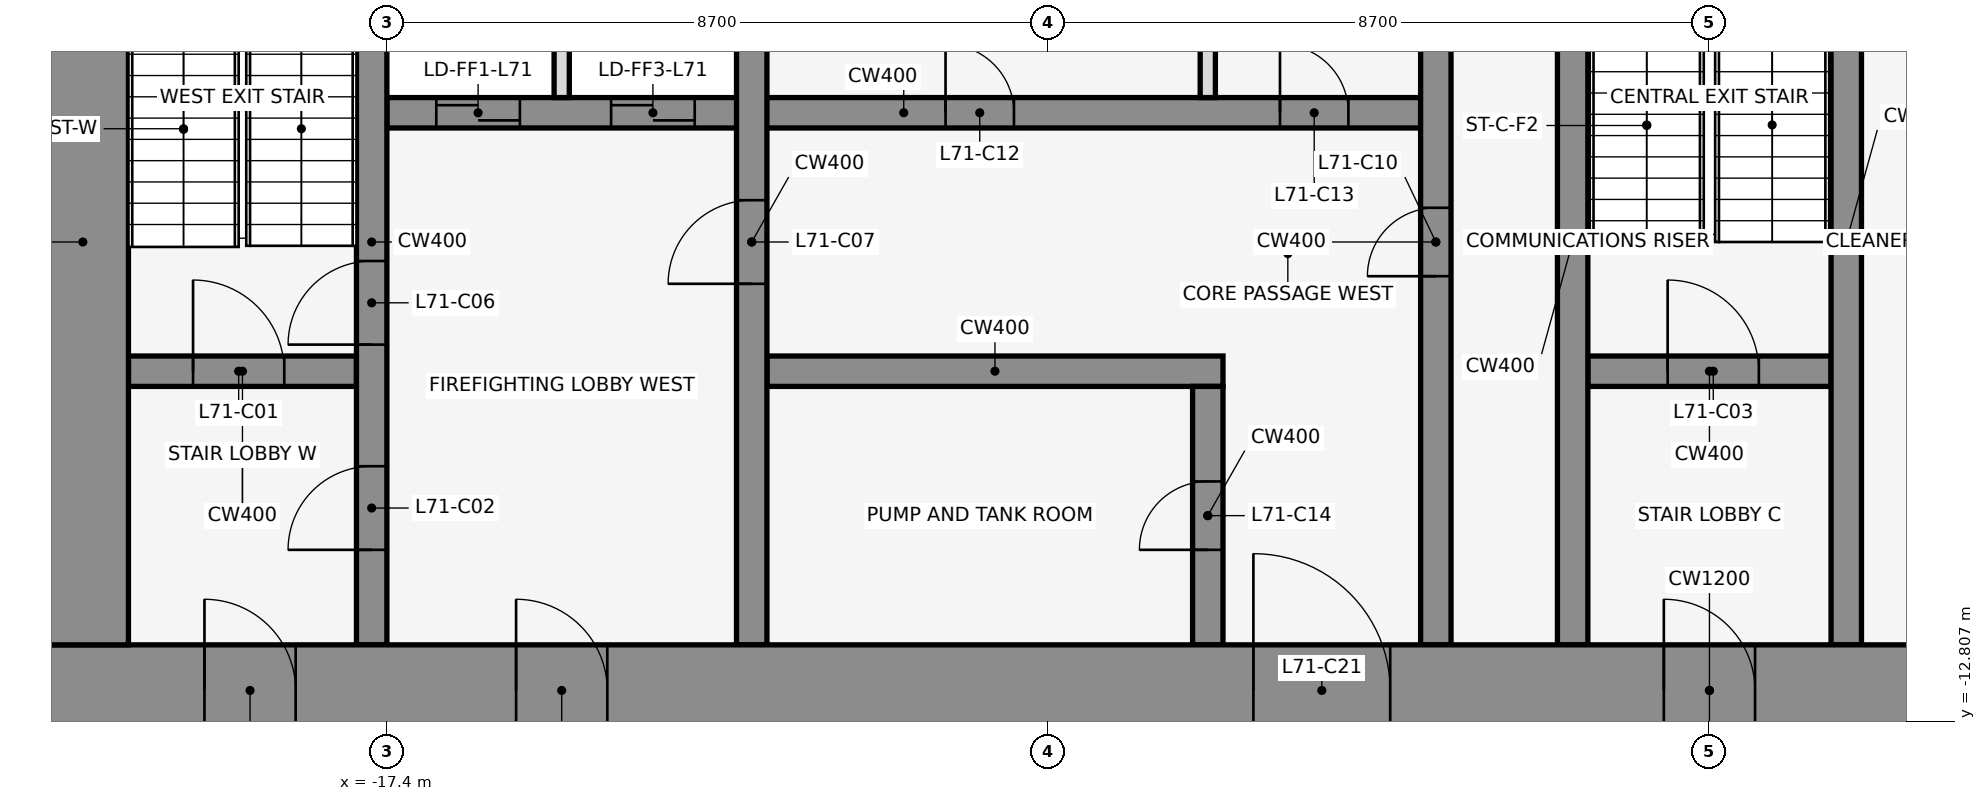
"""IFC4 building model, lengths in metres.
Left out: names, types, materials, properties, quantities, classifications, styles, units other than length and angle.
Written with IfcOpenShell. Run it as: python <this file> out.ifc"""

import sys

from ifc_helpers import new_model, si_unit, direction, frame, frame_2d, origin, place, context, subcontext, project, spatial, rectangle, extrude, element, fill, save


model = new_model("IFC4")
c1 = context("Model", 3, precision=1e-05, world=origin(), true_north=direction((0.0, 1.0)))
c2 = subcontext(c1, "Body", "Model", "MODEL_VIEW")
j1 = project(units=[si_unit("LENGTHUNIT", "METRE"), si_unit("PLANEANGLEUNIT", "RADIAN")], contexts=[c1])
p1 = place(None, origin())
s1 = spatial("IfcSite", under=j1, at=p1, CompositionType="ELEMENT")
p2 = place(p1, origin())
s2 = spatial("IfcBuilding", under=s1, at=p2, CompositionType="ELEMENT")
p3 = place(p2, frame((0.0, 0.0, 315.5)))
s3 = spatial("IfcBuildingStorey", under=s2, at=p3, CompositionType="ELEMENT", Elevation=315.5)
p4 = place(p3, frame((-20.8, -8.2, 0.0), z_axis=(0.0, 0.0, 1.0), x_axis=(1.0, 0.0, 0.0)))
e1 = element("IfcWall", 1, at=p4, inside=s3, PredefinedType="SHEAR", context=c2, shape_type="SweptSolid", body=[
    extrude(rectangle(XDim=3.0, YDim=0.4, at=frame_2d((1.5, 0.0))), origin(), (0.0, 0.0, 1.0), 4.5),
])
p5 = place(p4, frame((0.85, 0.0, 0.0)))
e2 = element("IfcOpeningElement", 2, at=p5, cuts=e1, PredefinedType="OPENING", context=c2, shape_type="SweptSolid", body=[
    extrude(rectangle(XDim=1.2, YDim=2.1, at=frame_2d((0.6, 1.05))), frame((0.0, 0.212, 0.0), z_axis=(0.0, -1.0, 0.0), x_axis=(1.0, 0.0, 0.0)), (0.0, 0.0, 1.0), 0.424),
])
p6 = place(p3, frame((-12.4, -8.2, 0.0), z_axis=(0.0, 0.0, 1.0), x_axis=(1.0, 0.0, 0.0)))
e3 = element("IfcWall", 3, at=p6, inside=s3, PredefinedType="SHEAR", context=c2, shape_type="SweptSolid", body=[
    extrude(rectangle(XDim=6.0, YDim=0.4, at=frame_2d((3.0, 0.0))), origin(), (0.0, 0.0, 1.0), 4.5),
])
p7 = place(p3, frame((-1.6, -8.2, 0.0), z_axis=(0.0, 0.0, 1.0), x_axis=(1.0, 0.0, 0.0)))
e4 = element("IfcWall", 4, at=p7, inside=s3, PredefinedType="SHEAR", context=c2, shape_type="SweptSolid", body=[
    extrude(rectangle(XDim=3.2, YDim=0.4, at=frame_2d((1.6, 0.0))), origin(), (0.0, 0.0, 1.0), 4.5),
])
p8 = place(p7, frame((1.05, 0.0, 0.0)))
e5 = element("IfcOpeningElement", 5, at=p8, cuts=e4, PredefinedType="OPENING", context=c2, shape_type="SweptSolid", body=[
    extrude(rectangle(XDim=1.2, YDim=2.1, at=frame_2d((0.6, 1.05))), frame((0.0, 0.212, 0.0), z_axis=(0.0, -1.0, 0.0), x_axis=(1.0, 0.0, 0.0)), (0.0, 0.0, 1.0), 0.424),
])
p9 = place(p3, frame((-17.4, -4.8, 0.0), z_axis=(0.0, 0.0, 1.0), x_axis=(1.0, 0.0, 0.0)))
e6 = element("IfcWall", 6, at=p9, inside=s3, PredefinedType="SHEAR", context=c2, shape_type="SweptSolid", body=[
    extrude(rectangle(XDim=13.6, YDim=0.4, at=frame_2d((6.8, 0.0))), origin(), (0.0, 0.0, 1.0), 4.5),
])
p10 = place(p9, frame((0.65, 0.0, 0.0)))
e7 = element("IfcOpeningElement", 7, at=p10, cuts=e6, PredefinedType="OPENING", context=c2, shape_type="SweptSolid", body=[
    extrude(rectangle(XDim=1.1, YDim=2.1, at=frame_2d((0.55, 1.05))), frame((0.0, 0.212, 0.0), z_axis=(0.0, -1.0, 0.0), x_axis=(1.0, 0.0, 0.0)), (0.0, 0.0, 1.0), 0.424),
])
p11 = place(p9, frame((2.95, 0.0, 0.0)))
e8 = element("IfcOpeningElement", 8, at=p11, cuts=e6, PredefinedType="OPENING", context=c2, shape_type="SweptSolid", body=[
    extrude(rectangle(XDim=1.1, YDim=2.1, at=frame_2d((0.55, 1.05))), frame((0.0, 0.212, 0.0), z_axis=(0.0, -1.0, 0.0), x_axis=(1.0, 0.0, 0.0)), (0.0, 0.0, 1.0), 0.424),
])
p12 = place(p9, frame((7.35, 0.0, 0.0)))
e9 = element("IfcOpeningElement", 9, at=p12, cuts=e6, PredefinedType="OPENING", context=c2, shape_type="SweptSolid", body=[
    extrude(rectangle(XDim=0.9, YDim=2.1, at=frame_2d((0.45, 1.05))), frame((0.0, 0.212, 0.0), z_axis=(0.0, -1.0, 0.0), x_axis=(1.0, 0.0, 0.0)), (0.0, 0.0, 1.0), 0.424),
])
p13 = place(p9, frame((11.75, 0.0, 0.0)))
e10 = element("IfcOpeningElement", 10, at=p13, cuts=e6, PredefinedType="OPENING", context=c2, shape_type="SweptSolid", body=[
    extrude(rectangle(XDim=0.9, YDim=2.1, at=frame_2d((0.45, 1.05))), frame((0.0, 0.212, 0.0), z_axis=(0.0, -1.0, 0.0), x_axis=(1.0, 0.0, 0.0)), (0.0, 0.0, 1.0), 0.424),
])
p14 = place(p3, frame((-17.6, -11.8, 0.0), z_axis=(0.0, 0.0, 1.0), x_axis=(0.0, 1.0, 0.0)))
e11 = element("IfcWall", 11, at=p14, inside=s3, PredefinedType="SHEAR", context=c2, shape_type="SweptSolid", body=[
    extrude(rectangle(XDim=10.6, YDim=0.4, at=frame_2d((5.3, 0.0))), origin(), (0.0, 0.0, 1.0), 4.5),
])
p15 = place(p14, frame((1.25, 0.0, 0.0)))
e12 = element("IfcOpeningElement", 12, at=p15, cuts=e11, PredefinedType="OPENING", context=c2, shape_type="SweptSolid", body=[
    extrude(rectangle(XDim=1.1, YDim=2.1, at=frame_2d((0.55, 1.05))), frame((0.0, 0.212, 0.0), z_axis=(0.0, -1.0, 0.0), x_axis=(1.0, 0.0, 0.0)), (0.0, 0.0, 1.0), 0.424),
])
p16 = place(p14, frame((3.95, 0.0, 0.0)))
e13 = element("IfcOpeningElement", 13, at=p16, cuts=e11, PredefinedType="OPENING", context=c2, shape_type="SweptSolid", body=[
    extrude(rectangle(XDim=1.1, YDim=2.1, at=frame_2d((0.55, 1.05))), frame((0.0, 0.212, 0.0), z_axis=(0.0, -1.0, 0.0), x_axis=(1.0, 0.0, 0.0)), (0.0, 0.0, 1.0), 0.424),
])
p17 = place(p3, frame((-15.1, -4.6, 0.0), z_axis=(0.0, 0.0, 1.0), x_axis=(0.0, 1.0, 0.0)))
e14 = element("IfcWall", 14, at=p17, inside=s3, PredefinedType="PARTITIONING", context=c2, shape_type="SweptSolid", body=[
    extrude(rectangle(XDim=3.4, YDim=0.2, at=frame_2d((1.7, 0.0))), origin(), (0.0, 0.0, 1.0), 3.418),
])
p18 = place(p3, frame((-12.6, -11.8, 0.0), z_axis=(0.0, 0.0, 1.0), x_axis=(0.0, 1.0, 0.0)))
e15 = element("IfcWall", 15, at=p18, inside=s3, PredefinedType="SHEAR", context=c2, shape_type="SweptSolid", body=[
    extrude(rectangle(XDim=10.6, YDim=0.4, at=frame_2d((5.3, 0.0))), origin(), (0.0, 0.0, 1.0), 4.5),
])
p19 = place(p18, frame((4.75, 0.0, 0.0)))
e16 = element("IfcOpeningElement", 16, at=p19, cuts=e15, PredefinedType="OPENING", context=c2, shape_type="SweptSolid", body=[
    extrude(rectangle(XDim=1.1, YDim=2.1, at=frame_2d((0.55, 1.05))), frame((0.0, 0.212, 0.0), z_axis=(0.0, -1.0, 0.0), x_axis=(1.0, 0.0, 0.0)), (0.0, 0.0, 1.0), 0.424),
])
p20 = place(p3, frame((-6.6, -11.8, 0.0), z_axis=(0.0, 0.0, 1.0), x_axis=(0.0, 1.0, 0.0)))
e17 = element("IfcWall", 17, at=p20, inside=s3, PredefinedType="SHEAR", context=c2, shape_type="SweptSolid", body=[
    extrude(rectangle(XDim=3.4, YDim=0.4, at=frame_2d((1.7, 0.0))), origin(), (0.0, 0.0, 1.0), 4.5),
])
p21 = place(p20, frame((1.25, 0.0, 0.0)))
e18 = element("IfcOpeningElement", 18, at=p21, cuts=e17, PredefinedType="OPENING", context=c2, shape_type="SweptSolid", body=[
    extrude(rectangle(XDim=0.9, YDim=2.1, at=frame_2d((0.45, 1.05))), frame((0.0, 0.212, 0.0), z_axis=(0.0, -1.0, 0.0), x_axis=(1.0, 0.0, 0.0)), (0.0, 0.0, 1.0), 0.424),
])
p22 = place(p3, frame((-6.6, -4.6, 0.0), z_axis=(0.0, 0.0, 1.0), x_axis=(0.0, 1.0, 0.0)))
e19 = element("IfcWall", 19, at=p22, inside=s3, PredefinedType="PARTITIONING", context=c2, shape_type="SweptSolid", body=[
    extrude(rectangle(XDim=3.4, YDim=0.2, at=frame_2d((1.7, 0.0))), origin(), (0.0, 0.0, 1.0), 3.418),
])
p23 = place(p3, frame((-3.6, -11.8, 0.0), z_axis=(0.0, 0.0, 1.0), x_axis=(0.0, 1.0, 0.0)))
e20 = element("IfcWall", 20, at=p23, inside=s3, PredefinedType="SHEAR", context=c2, shape_type="SweptSolid", body=[
    extrude(rectangle(XDim=10.6, YDim=0.4, at=frame_2d((5.3, 0.0))), origin(), (0.0, 0.0, 1.0), 4.5),
])
p24 = place(p23, frame((4.85, 0.0, 0.0)))
e21 = element("IfcOpeningElement", 21, at=p24, cuts=e20, PredefinedType="OPENING", context=c2, shape_type="SweptSolid", body=[
    extrude(rectangle(XDim=0.9, YDim=2.1, at=frame_2d((0.45, 1.05))), frame((0.0, 0.212, 0.0), z_axis=(0.0, -1.0, 0.0), x_axis=(1.0, 0.0, 0.0)), (0.0, 0.0, 1.0), 0.424),
])
for number, where, z_axis, x_axis in (
    (22, (-1.8, -11.8, 0.0), (0.0, 0.0, 1.0), (0.0, 1.0, 0.0)),
    (23, (1.8, -11.8, 0.0), (0.0, 0.0, 1.0), (0.0, 1.0, 0.0)),
):
    element("IfcWall", number, at=place(p3, frame(where, z_axis=z_axis, x_axis=x_axis)), inside=s3, PredefinedType="SHEAR", context=c2, shape_type="SweptSolid", body=[
        extrude(rectangle(XDim=10.6, YDim=0.4, at=frame_2d((5.3, 0.0))), origin(), (0.0, 0.0, 1.0), 4.5),
    ])
p25 = place(p3, frame((-22.0, -12.4, 0.0), z_axis=(0.0, 0.0, 1.0), x_axis=(1.0, 0.0, 0.0)))
e24 = element("IfcWall", 24, at=p25, inside=s3, PredefinedType="SHEAR", context=c2, shape_type="SweptSolid", body=[
    extrude(rectangle(XDim=44.0, YDim=1.2, at=frame_2d((22.0, 0.0))), origin(), (0.0, 0.0, 1.0), 4.5),
])
p26 = place(p25, frame((2.2, 0.0, 0.0)))
e25 = element("IfcOpeningElement", 25, at=p26, cuts=e24, PredefinedType="OPENING", context=c2, shape_type="SweptSolid", body=[
    extrude(rectangle(XDim=1.2, YDim=2.1, at=frame_2d((0.6, 1.05))), frame((0.0, 0.612, 0.0), z_axis=(0.0, -1.0, 0.0), x_axis=(1.0, 0.0, 0.0)), (0.0, 0.0, 1.0), 1.224),
])
p27 = place(p25, frame((21.4, 0.0, 0.0)))
e26 = element("IfcOpeningElement", 26, at=p27, cuts=e24, PredefinedType="OPENING", context=c2, shape_type="SweptSolid", body=[
    extrude(rectangle(XDim=1.2, YDim=2.1, at=frame_2d((0.6, 1.05))), frame((0.0, 0.612, 0.0), z_axis=(0.0, -1.0, 0.0), x_axis=(1.0, 0.0, 0.0)), (0.0, 0.0, 1.0), 1.224),
])
p28 = place(p25, frame((40.6, 0.0, 0.0)))
e27 = element("IfcOpeningElement", 27, at=p28, cuts=e24, PredefinedType="OPENING", context=c2, shape_type="SweptSolid", body=[
    extrude(rectangle(XDim=1.2, YDim=2.1, at=frame_2d((0.6, 1.05))), frame((0.0, 0.612, 0.0), z_axis=(0.0, -1.0, 0.0), x_axis=(1.0, 0.0, 0.0)), (0.0, 0.0, 1.0), 1.224),
])
p29 = place(p25, frame((16.0, 0.0, 0.0)))
e28 = element("IfcOpeningElement", 28, at=p29, cuts=e24, PredefinedType="OPENING", context=c2, shape_type="SweptSolid", body=[
    extrude(rectangle(XDim=1.8, YDim=2.1, at=frame_2d((0.9, 1.05))), frame((0.0, 0.612, 0.0), z_axis=(0.0, -1.0, 0.0), x_axis=(1.0, 0.0, 0.0)), (0.0, 0.0, 1.0), 1.224),
])
p30 = place(p25, frame((6.3, 0.0, 0.0)))
e29 = element("IfcOpeningElement", 29, at=p30, cuts=e24, PredefinedType="OPENING", context=c2, shape_type="SweptSolid", body=[
    extrude(rectangle(XDim=1.2, YDim=2.1, at=frame_2d((0.6, 1.05))), frame((0.0, 0.612, 0.0), z_axis=(0.0, -1.0, 0.0), x_axis=(1.0, 0.0, 0.0)), (0.0, 0.0, 1.0), 1.224),
])
p31 = place(p25, frame((26.2, 0.0, 0.0)))
e30 = element("IfcOpeningElement", 30, at=p31, cuts=e24, PredefinedType="OPENING", context=c2, shape_type="SweptSolid", body=[
    extrude(rectangle(XDim=1.8, YDim=2.1, at=frame_2d((0.9, 1.05))), frame((0.0, 0.612, 0.0), z_axis=(0.0, -1.0, 0.0), x_axis=(1.0, 0.0, 0.0)), (0.0, 0.0, 1.0), 1.224),
])
p32 = place(p25, frame((36.5, 0.0, 0.0)))
e31 = element("IfcOpeningElement", 31, at=p32, cuts=e24, PredefinedType="OPENING", context=c2, shape_type="SweptSolid", body=[
    extrude(rectangle(XDim=1.2, YDim=2.1, at=frame_2d((0.6, 1.05))), frame((0.0, 0.612, 0.0), z_axis=(0.0, -1.0, 0.0), x_axis=(1.0, 0.0, 0.0)), (0.0, 0.0, 1.0), 1.224),
])
p33 = place(p3, frame((-21.4, -11.8, 0.0), z_axis=(0.0, 0.0, 1.0), x_axis=(0.0, 1.0, 0.0)))
e32 = element("IfcWall", 32, at=p33, inside=s3, PredefinedType="SHEAR", context=c2, shape_type="SweptSolid", body=[
    extrude(rectangle(XDim=10.6, YDim=1.2, at=frame_2d((5.3, 0.0))), origin(), (0.0, 0.0, 1.0), 4.5),
])
p34 = place(p5, origin())
e33 = element("IfcDoor", 33, at=p34, inside=s3, OperationType="SINGLE_SWING_LEFT", PredefinedType="DOOR", context=c2, shape_type="SweptSolid", body=[
    extrude(rectangle(XDim=1.2, YDim=2.1, at=frame_2d((0.6, 1.05))), frame((0.0, 0.025, 0.0), z_axis=(0.0, -1.0, 0.0), x_axis=(1.0, 0.0, 0.0)), (0.0, 0.0, 1.0), 0.05),
])
fill(e2, e33)
p35 = place(p15, frame((1.1, 0.0, 0.0), z_axis=(0.0, 0.0, 1.0), x_axis=(-1.0, 0.0, 0.0)))
e34 = element("IfcDoor", 34, at=p35, inside=s3, OperationType="SINGLE_SWING_LEFT", PredefinedType="DOOR", context=c2, shape_type="SweptSolid", body=[
    extrude(rectangle(XDim=1.1, YDim=2.1, at=frame_2d((0.55, 1.05))), frame((0.0, 0.025, 0.0), z_axis=(0.0, -1.0, 0.0), x_axis=(1.0, 0.0, 0.0)), (0.0, 0.0, 1.0), 0.05),
])
fill(e12, e34)
p36 = place(p8, origin())
e35 = element("IfcDoor", 35, at=p36, inside=s3, OperationType="SINGLE_SWING_LEFT", PredefinedType="DOOR", context=c2, shape_type="SweptSolid", body=[
    extrude(rectangle(XDim=1.2, YDim=2.1, at=frame_2d((0.6, 1.05))), frame((0.0, 0.025, 0.0), z_axis=(0.0, -1.0, 0.0), x_axis=(1.0, 0.0, 0.0)), (0.0, 0.0, 1.0), 0.05),
])
fill(e5, e35)
p37 = place(p10, origin())
e36 = element("IfcDoor", 36, at=p37, inside=s3, OperationType="DOUBLE_DOOR_SLIDING", PredefinedType="DOOR", context=c2, shape_type="SweptSolid", body=[
    extrude(rectangle(XDim=1.1, YDim=2.1, at=frame_2d((0.55, 1.05))), frame((0.0, 0.025, 0.0), z_axis=(0.0, -1.0, 0.0), x_axis=(1.0, 0.0, 0.0)), (0.0, 0.0, 1.0), 0.05),
])
fill(e7, e36)
p38 = place(p11, origin())
e37 = element("IfcDoor", 37, at=p38, inside=s3, OperationType="DOUBLE_DOOR_SLIDING", PredefinedType="DOOR", context=c2, shape_type="SweptSolid", body=[
    extrude(rectangle(XDim=1.1, YDim=2.1, at=frame_2d((0.55, 1.05))), frame((0.0, 0.025, 0.0), z_axis=(0.0, -1.0, 0.0), x_axis=(1.0, 0.0, 0.0)), (0.0, 0.0, 1.0), 0.05),
])
fill(e8, e37)
p39 = place(p16, frame((1.1, 0.0, 0.0), z_axis=(0.0, 0.0, 1.0), x_axis=(-1.0, 0.0, 0.0)))
e38 = element("IfcDoor", 38, at=p39, inside=s3, OperationType="SINGLE_SWING_LEFT", PredefinedType="DOOR", context=c2, shape_type="SweptSolid", body=[
    extrude(rectangle(XDim=1.1, YDim=2.1, at=frame_2d((0.55, 1.05))), frame((0.0, 0.025, 0.0), z_axis=(0.0, -1.0, 0.0), x_axis=(1.0, 0.0, 0.0)), (0.0, 0.0, 1.0), 0.05),
])
fill(e13, e38)
p40 = place(p19, origin())
e39 = element("IfcDoor", 39, at=p40, inside=s3, OperationType="SINGLE_SWING_LEFT", PredefinedType="DOOR", context=c2, shape_type="SweptSolid", body=[
    extrude(rectangle(XDim=1.1, YDim=2.1, at=frame_2d((0.55, 1.05))), frame((0.0, 0.025, 0.0), z_axis=(0.0, -1.0, 0.0), x_axis=(1.0, 0.0, 0.0)), (0.0, 0.0, 1.0), 0.05),
])
fill(e16, e39)
p41 = place(p24, frame((0.9, 0.0, 0.0), z_axis=(0.0, 0.0, 1.0), x_axis=(-1.0, 0.0, 0.0)))
e40 = element("IfcDoor", 40, at=p41, inside=s3, OperationType="SINGLE_SWING_LEFT", PredefinedType="DOOR", context=c2, shape_type="SweptSolid", body=[
    extrude(rectangle(XDim=0.9, YDim=2.1, at=frame_2d((0.45, 1.05))), frame((0.0, 0.025, 0.0), z_axis=(0.0, -1.0, 0.0), x_axis=(1.0, 0.0, 0.0)), (0.0, 0.0, 1.0), 0.05),
])
fill(e21, e40)
p42 = place(p12, origin())
e41 = element("IfcDoor", 41, at=p42, inside=s3, OperationType="SINGLE_SWING_RIGHT", PredefinedType="DOOR", context=c2, shape_type="SweptSolid", body=[
    extrude(rectangle(XDim=0.9, YDim=2.1, at=frame_2d((0.45, 1.05))), frame((0.0, 0.025, 0.0), z_axis=(0.0, -1.0, 0.0), x_axis=(1.0, 0.0, 0.0)), (0.0, 0.0, 1.0), 0.05),
])
fill(e9, e41)
p43 = place(p13, origin())
e42 = element("IfcDoor", 42, at=p43, inside=s3, OperationType="SINGLE_SWING_LEFT", PredefinedType="DOOR", context=c2, shape_type="SweptSolid", body=[
    extrude(rectangle(XDim=0.9, YDim=2.1, at=frame_2d((0.45, 1.05))), frame((0.0, 0.025, 0.0), z_axis=(0.0, -1.0, 0.0), x_axis=(1.0, 0.0, 0.0)), (0.0, 0.0, 1.0), 0.05),
])
fill(e10, e42)
p44 = place(p21, origin())
e43 = element("IfcDoor", 43, at=p44, inside=s3, OperationType="SINGLE_SWING_RIGHT", PredefinedType="DOOR", context=c2, shape_type="SweptSolid", body=[
    extrude(rectangle(XDim=0.9, YDim=2.1, at=frame_2d((0.45, 1.05))), frame((0.0, 0.025, 0.0), z_axis=(0.0, -1.0, 0.0), x_axis=(1.0, 0.0, 0.0)), (0.0, 0.0, 1.0), 0.05),
])
fill(e18, e43)
p45 = place(p26, frame((1.2, 0.0, 0.0), z_axis=(0.0, 0.0, 1.0), x_axis=(-1.0, 0.0, 0.0)))
e44 = element("IfcDoor", 44, at=p45, inside=s3, OperationType="SINGLE_SWING_RIGHT", PredefinedType="DOOR", context=c2, shape_type="SweptSolid", body=[
    extrude(rectangle(XDim=1.2, YDim=2.1, at=frame_2d((0.6, 1.05))), frame((0.0, 0.025, 0.0), z_axis=(0.0, -1.0, 0.0), x_axis=(1.0, 0.0, 0.0)), (0.0, 0.0, 1.0), 0.05),
])
fill(e25, e44)
p46 = place(p27, frame((1.2, 0.0, 0.0), z_axis=(0.0, 0.0, 1.0), x_axis=(-1.0, 0.0, 0.0)))
e45 = element("IfcDoor", 45, at=p46, inside=s3, OperationType="SINGLE_SWING_RIGHT", PredefinedType="DOOR", context=c2, shape_type="SweptSolid", body=[
    extrude(rectangle(XDim=1.2, YDim=2.1, at=frame_2d((0.6, 1.05))), frame((0.0, 0.025, 0.0), z_axis=(0.0, -1.0, 0.0), x_axis=(1.0, 0.0, 0.0)), (0.0, 0.0, 1.0), 0.05),
])
fill(e26, e45)
p47 = place(p29, origin())
e46 = element("IfcDoor", 46, at=p47, inside=s3, OperationType="SINGLE_SWING_LEFT", PredefinedType="DOOR", context=c2, shape_type="SweptSolid", body=[
    extrude(rectangle(XDim=1.8, YDim=2.1, at=frame_2d((0.9, 1.05))), frame((0.0, 0.025, 0.0), z_axis=(0.0, -1.0, 0.0), x_axis=(1.0, 0.0, 0.0)), (0.0, 0.0, 1.0), 0.05),
])
fill(e28, e46)
p48 = place(p30, frame((1.2, 0.0, 0.0), z_axis=(0.0, 0.0, 1.0), x_axis=(-1.0, 0.0, 0.0)))
e47 = element("IfcDoor", 47, at=p48, inside=s3, OperationType="SINGLE_SWING_RIGHT", PredefinedType="DOOR", context=c2, shape_type="SweptSolid", body=[
    extrude(rectangle(XDim=1.2, YDim=2.1, at=frame_2d((0.6, 1.05))), frame((0.0, 0.025, 0.0), z_axis=(0.0, -1.0, 0.0), x_axis=(1.0, 0.0, 0.0)), (0.0, 0.0, 1.0), 0.05),
])
fill(e29, e47)
save(model, sys.argv[1])
